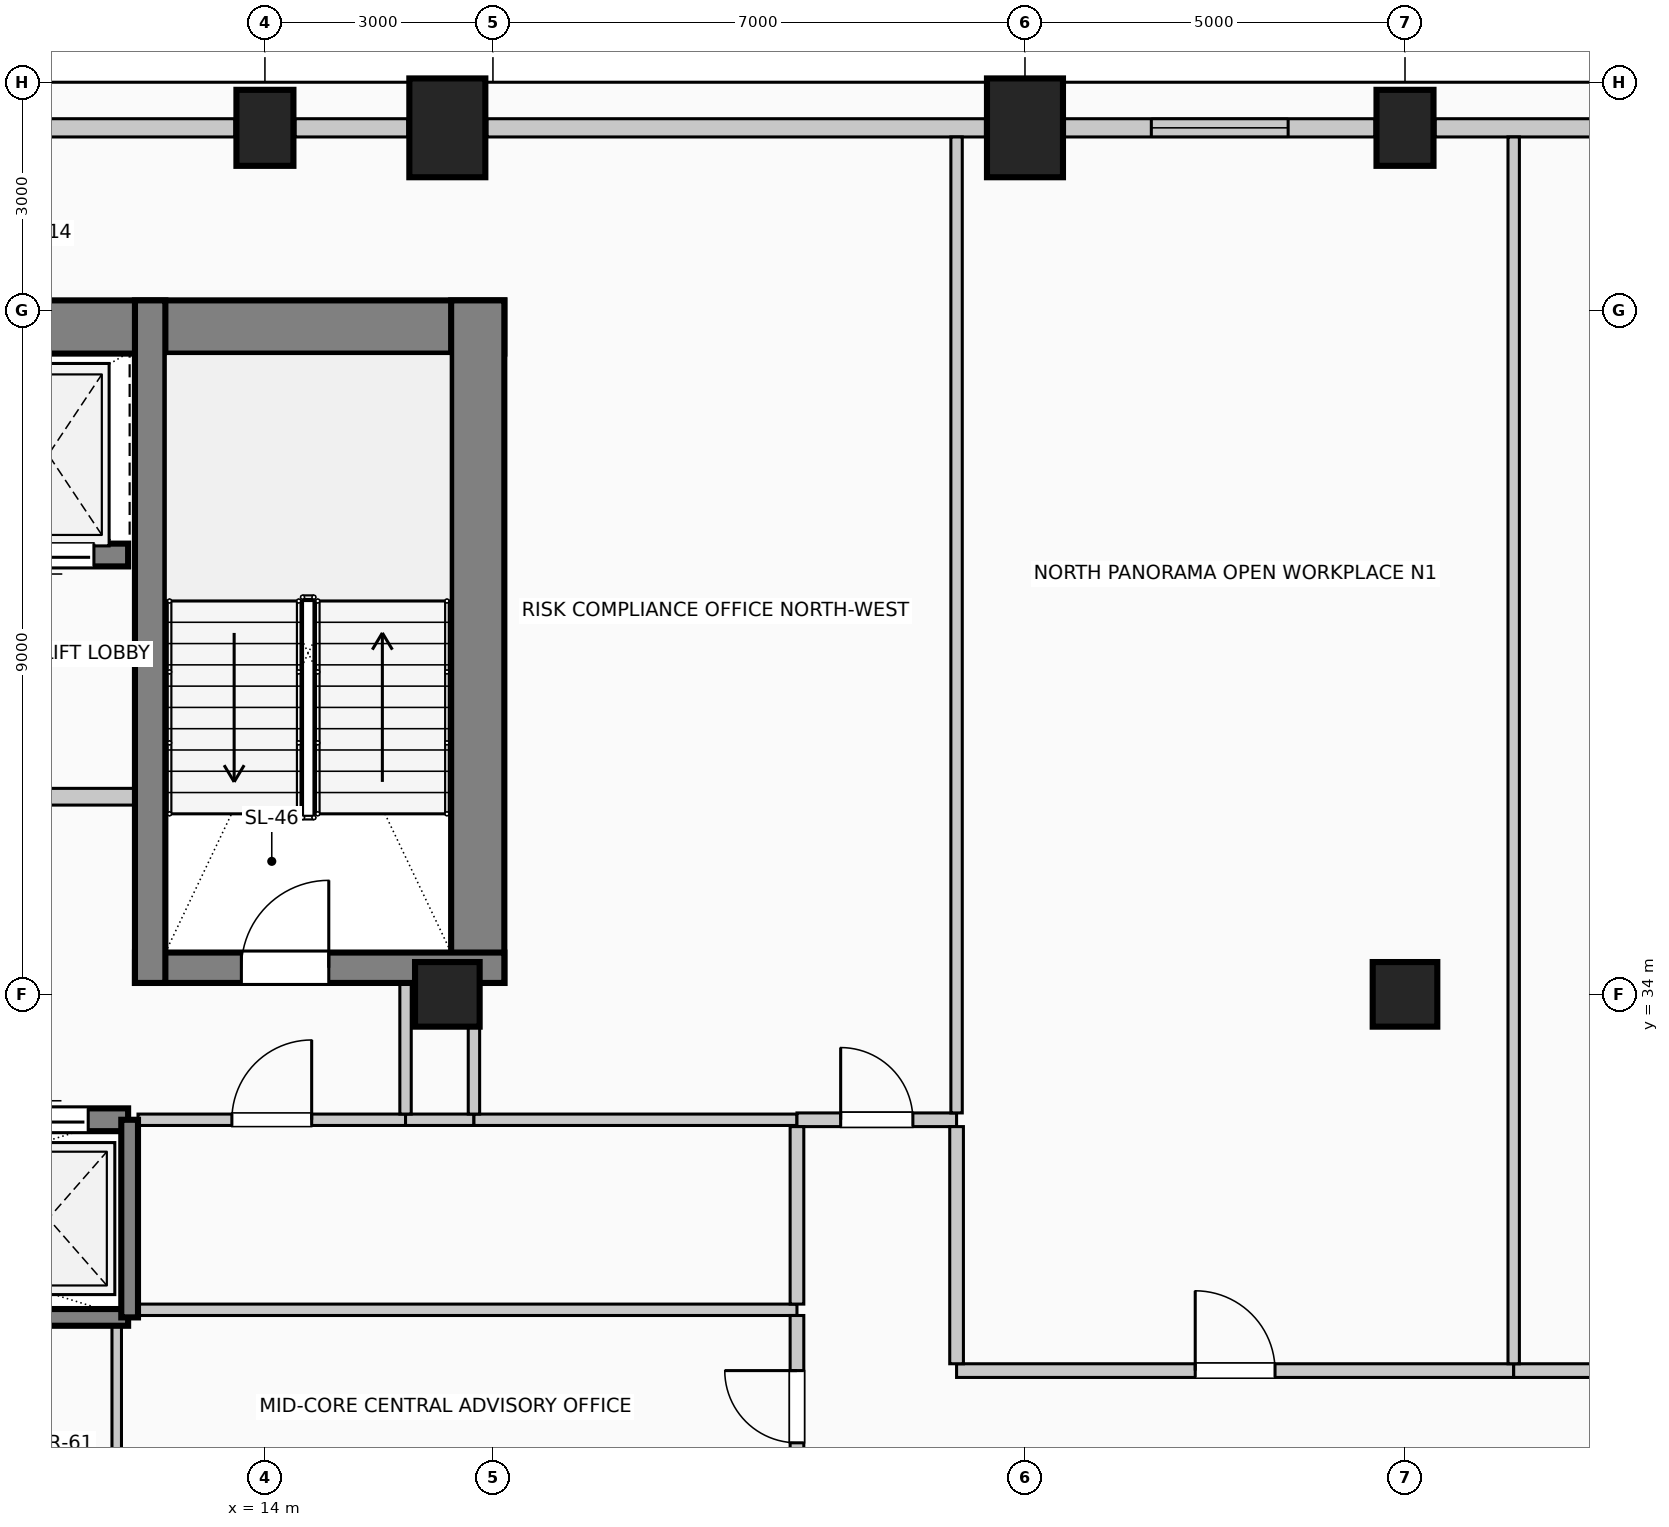
"""IFC4 building model, lengths in metres.
Left out: names, types, materials, properties, quantities, classifications, styles, units other than length and angle.
Written with IfcOpenShell. Run it as: python <this file> out.ifc"""

import sys

from ifc_helpers import new_model, si_unit, direction, frame, frame_2d, origin, origin_2d, place, context, subcontext, project, spatial, rectangle, circle, extrude, element, fill, save


model = new_model("IFC4")
c1 = context("Model", 3, precision=1e-05, world=origin(), true_north=direction((0.0, 1.0)))
c2 = subcontext(c1, "Body", "Model", "MODEL_VIEW")
j1 = project(units=[si_unit("LENGTHUNIT", "METRE"), si_unit("PLANEANGLEUNIT", "RADIAN")], contexts=[c1])
p1 = place(None, origin())
s1 = spatial("IfcSite", under=j1, at=p1, CompositionType="ELEMENT")
p2 = place(p1, origin())
s2 = spatial("IfcBuilding", under=s1, at=p2, CompositionType="ELEMENT")
p3 = place(p2, frame((0.0, 0.0, 248.6)))
s3 = spatial("IfcBuildingStorey", under=s2, at=p3, CompositionType="ELEMENT", Elevation=248.6)
p4 = place(p3, frame((2.85, 42.78, 0.0), z_axis=(0.0, 0.0, 1.0), x_axis=(1.0, 0.0, 0.0)))
e1 = element("IfcWall", 1, at=p4, inside=s3, PredefinedType="SHEAR", context=c2, shape_type="SweptSolid", body=[
    extrude(rectangle(XDim=14.3, YDim=0.7, at=frame_2d((7.15, 0.0))), origin(), (0.0, 0.0, 1.0), 4.0),
])
p5 = place(p3, frame((16.8, 34.15, 0.0), z_axis=(0.0, 0.0, 1.0), x_axis=(0.0, 1.0, 0.0)))
e2 = element("IfcWall", 2, at=p5, inside=s3, PredefinedType="SHEAR", context=c2, shape_type="SweptSolid", body=[
    extrude(rectangle(XDim=8.98, YDim=0.7, at=frame_2d((4.49, 0.0))), origin(), (0.0, 0.0, 1.0), 4.0),
])
p6 = place(p3, frame((12.29, 34.35, 0.0), z_axis=(0.0, 0.0, 1.0), x_axis=(1.0, 0.0, 0.0)))
e3 = element("IfcWall", 3, at=p6, inside=s3, PredefinedType="SHEAR", context=c2, shape_type="SweptSolid", body=[
    extrude(rectangle(XDim=4.86, YDim=0.4, at=frame_2d((2.43, 0.0))), origin(), (0.0, 0.0, 1.0), 4.0),
])
p7 = place(p6, frame((1.4, 0.0, 0.0)))
e4 = element("IfcOpeningElement", 4, at=p7, cuts=e3, PredefinedType="OPENING", context=c2, shape_type="SweptSolid", body=[
    extrude(rectangle(XDim=1.15, YDim=2.2, at=frame_2d((0.575, 1.1))), frame((0.0, 0.21, 0.0), z_axis=(0.0, -1.0, 0.0), x_axis=(1.0, 0.0, 0.0)), (0.0, 0.0, 1.0), 0.42),
])
p8 = place(p3, frame((12.49, 34.15, 0.0), z_axis=(0.0, 0.0, 1.0), x_axis=(0.0, 1.0, 0.0)))
e5 = element("IfcWall", 5, at=p8, inside=s3, PredefinedType="SHEAR", context=c2, shape_type="SweptSolid", body=[
    extrude(rectangle(XDim=8.98, YDim=0.4, at=frame_2d((4.49, 0.0))), origin(), (0.0, 0.0, 1.0), 4.0),
])
p9 = place(p3, frame((14.0, 45.4, 0.0), z_axis=(0.0, 0.0, 1.0), x_axis=(1.0, 0.0, 0.0)))
e6 = element("IfcColumn", 6, at=p9, inside=s3, PredefinedType="COLUMN", context=c2, shape_type="SweptSolid", body=[
    extrude(rectangle(XDim=0.75, YDim=1.0, at=origin_2d()), origin(), (0.0, 0.0, 1.0), 4.0),
])
for number, where, z_axis, x_axis in (
    (7, (16.4, 45.4, 0.0), (0.0, 0.0, 1.0), (1.0, 0.0, 0.0)),
    (8, (24.0, 45.4, 0.0), (0.0, 0.0, 1.0), (1.0, 0.0, 0.0)),
):
    element("IfcColumn", number, at=place(p3, frame(where, z_axis=z_axis, x_axis=x_axis)), inside=s3, PredefinedType="COLUMN", context=c2, shape_type="SweptSolid", body=[
        extrude(rectangle(XDim=1.0, YDim=1.3, at=origin_2d()), origin(), (0.0, 0.0, 1.0), 4.0),
    ])
p10 = place(p3, frame((29.0, 45.4, 0.0), z_axis=(0.0, 0.0, 1.0), x_axis=(1.0, 0.0, 0.0)))
e9 = element("IfcColumn", 9, at=p10, inside=s3, PredefinedType="COLUMN", context=c2, shape_type="SweptSolid", body=[
    extrude(rectangle(XDim=0.75, YDim=1.0, at=origin_2d()), origin(), (0.0, 0.0, 1.0), 4.0),
])
for number, where, z_axis, x_axis in (
    (10, (16.4, 34.0, 0.0), (0.0, 0.0, 1.0), (1.0, 0.0, 0.0)),
    (11, (29.0, 34.0, 0.0), (0.0, 0.0, 1.0), (1.0, 0.0, 0.0)),
):
    element("IfcColumn", number, at=place(p3, frame(where, z_axis=z_axis, x_axis=x_axis)), inside=s3, PredefinedType="COLUMN", context=c2, shape_type="SweptSolid", body=[
        extrude(circle(Radius=0.425, at=origin_2d()), origin(), (0.0, 0.0, 1.0), 4.0),
    ])
p11 = place(p3, frame((8.895, 45.4, 0.0), z_axis=(0.0, 0.0, 1.0), x_axis=(1.0, 0.0, 0.0)))
e12 = element("IfcWall", 12, at=p11, inside=s3, PredefinedType="SOLIDWALL", context=c2, shape_type="SweptSolid", body=[
    extrude(rectangle(XDim=4.71, YDim=0.24, at=frame_2d((2.355, 0.0))), origin(), (0.0, 0.0, 1.0), 3.0),
])
p12 = place(p3, frame((14.395, 45.4, 0.0), z_axis=(0.0, 0.0, 1.0), x_axis=(1.0, 0.0, 0.0)))
e13 = element("IfcWall", 13, at=p12, inside=s3, PredefinedType="SOLIDWALL", context=c2, shape_type="SweptSolid", body=[
    extrude(rectangle(XDim=1.485, YDim=0.24, at=frame_2d((0.742, 0.0))), origin(), (0.0, 0.0, 1.0), 3.0),
])
p13 = place(p3, frame((16.92, 45.4, 0.0), z_axis=(0.0, 0.0, 1.0), x_axis=(1.0, 0.0, 0.0)))
e14 = element("IfcWall", 14, at=p13, inside=s3, PredefinedType="SOLIDWALL", context=c2, shape_type="SweptSolid", body=[
    extrude(rectangle(XDim=6.56, YDim=0.24, at=frame_2d((3.28, 0.0))), origin(), (0.0, 0.0, 1.0), 3.0),
])
p14 = place(p3, frame((24.52, 45.4, 0.0), z_axis=(0.0, 0.0, 1.0), x_axis=(1.0, 0.0, 0.0)))
e15 = element("IfcWall", 15, at=p14, inside=s3, PredefinedType="SOLIDWALL", context=c2, shape_type="SweptSolid", body=[
    extrude(rectangle(XDim=4.085, YDim=0.24, at=frame_2d((2.042, 0.0))), origin(), (0.0, 0.0, 1.0), 3.0),
])
p15 = place(p14, frame((1.143, 0.0, 0.42)))
e16 = element("IfcOpeningElement", 16, at=p15, cuts=e15, PredefinedType="OPENING", context=c2, shape_type="SweptSolid", body=[
    extrude(rectangle(XDim=1.8, YDim=2.2, at=frame_2d((0.9, 1.1))), frame((0.0, 0.13, 0.0), z_axis=(0.0, -1.0, 0.0), x_axis=(1.0, 0.0, 0.0)), (0.0, 0.0, 1.0), 0.26),
])
p16 = place(p3, frame((29.395, 45.4, 0.0), z_axis=(0.0, 0.0, 1.0), x_axis=(1.0, 0.0, 0.0)))
e17 = element("IfcWall", 17, at=p16, inside=s3, PredefinedType="SOLIDWALL", context=c2, shape_type="SweptSolid", body=[
    extrude(rectangle(XDim=4.085, YDim=0.24, at=frame_2d((2.042, 0.0))), origin(), (0.0, 0.0, 1.0), 3.0),
])
p17 = place(p3, frame((10.05, 32.35, 0.0), z_axis=(0.0, 0.0, 1.0), x_axis=(1.0, 0.0, 0.0)))
e18 = element("IfcWall", 18, at=p17, inside=s3, PredefinedType="SOLIDWALL", context=c2, shape_type="SweptSolid", body=[
    extrude(rectangle(XDim=2.15, YDim=0.3, at=frame_2d((1.075, 0.0))), origin(), (0.0, 0.0, 1.0), 4.0),
])
p18 = place(p17, frame((0.525, 0.0, 0.0)))
e19 = element("IfcOpeningElement", 19, at=p18, cuts=e18, PredefinedType="OPENING", context=c2, shape_type="SweptSolid", body=[
    extrude(rectangle(XDim=1.1, YDim=2.2, at=frame_2d((0.55, 1.1))), frame((0.0, 0.16, 0.0), z_axis=(0.0, -1.0, 0.0), x_axis=(1.0, 0.0, 0.0)), (0.0, 0.0, 1.0), 0.32),
])
p19 = place(p3, frame((12.2, 39.78, 0.0), z_axis=(0.0, 0.0, 1.0), x_axis=(-1.0, 0.0, 0.0)))
e20 = element("IfcWall", 20, at=p19, inside=s3, PredefinedType="SOLIDWALL", context=c2, shape_type="SweptSolid", body=[
    extrude(rectangle(XDim=2.2, YDim=0.3, at=frame_2d((1.1, 0.0))), origin(), (0.0, 0.0, 1.0), 4.0),
])
p20 = place(p19, frame((0.45, 0.0, 0.0)))
e21 = element("IfcOpeningElement", 21, at=p20, cuts=e20, PredefinedType="OPENING", context=c2, shape_type="SweptSolid", body=[
    extrude(rectangle(XDim=1.3, YDim=2.25, at=frame_2d((0.65, 1.125))), frame((0.0, 0.16, 0.0), z_axis=(0.0, -1.0, 0.0), x_axis=(1.0, 0.0, 0.0)), (0.0, 0.0, 1.0), 0.32),
])
p21 = place(p3, frame((3.55, 29.75, 0.0), z_axis=(0.0, 0.0, 1.0), x_axis=(1.0, 0.0, 0.0)))
e22 = element("IfcWall", 22, at=p21, inside=s3, PredefinedType="SOLIDWALL", context=c2, shape_type="SweptSolid", body=[
    extrude(rectangle(XDim=8.65, YDim=0.22, at=frame_2d((4.325, 0.0))), origin(), (0.0, 0.0, 1.0), 4.0),
])
p22 = place(p3, frame((12.22, 29.75, 0.0), z_axis=(0.0, 0.0, 1.0), x_axis=(0.0, 1.0, 0.0)))
e23 = element("IfcWall", 23, at=p22, inside=s3, PredefinedType="SOLIDWALL", context=c2, shape_type="SweptSolid", body=[
    extrude(rectangle(XDim=2.6, YDim=0.22, at=frame_2d((1.3, 0.0))), origin(), (0.0, 0.0, 1.0), 4.0),
])
p23 = place(p3, frame((7.51, 36.6, 0.0), z_axis=(0.0, 0.0, 1.0), x_axis=(1.0, 0.0, 0.0)))
e24 = element("IfcWall", 24, at=p23, inside=s3, PredefinedType="PARTITIONING", context=c2, shape_type="SweptSolid", body=[
    extrude(rectangle(XDim=4.98, YDim=0.22, at=frame_2d((2.49, 0.0))), origin(), (0.0, 0.0, 1.0), 3.75),
])
p24 = place(p23, frame((1.94, 0.0, 0.0)))
e25 = element("IfcOpeningElement", 25, at=p24, cuts=e24, PredefinedType="OPENING", context=c2, shape_type="SweptSolid", body=[
    extrude(rectangle(XDim=1.1, YDim=2.2, at=frame_2d((0.55, 1.1))), frame((0.0, 0.12, 0.0), z_axis=(0.0, -1.0, 0.0), x_axis=(1.0, 0.0, 0.0)), (0.0, 0.0, 1.0), 0.24),
])
p25 = place(p3, frame((23.1, 29.05, 0.0), z_axis=(0.0, 0.0, 1.0), x_axis=(1.0, 0.0, 0.0)))
e26 = element("IfcWall", 26, at=p25, inside=s3, PredefinedType="PARTITIONING", context=c2, shape_type="SweptSolid", body=[
    extrude(rectangle(XDim=7.33, YDim=0.18, at=frame_2d((3.665, 0.0))), origin(), (0.0, 0.0, 1.0), 3.75),
])
p26 = place(p25, frame((3.14, 0.0, 0.0)))
e27 = element("IfcOpeningElement", 27, at=p26, cuts=e26, PredefinedType="OPENING", context=c2, shape_type="SweptSolid", body=[
    extrude(rectangle(XDim=1.05, YDim=2.15, at=frame_2d((0.525, 1.075))), frame((0.0, 0.1, 0.0), z_axis=(0.0, -1.0, 0.0), x_axis=(1.0, 0.0, 0.0)), (0.0, 0.0, 1.0), 0.2),
])
p27 = place(p3, frame((30.43, 29.05, 0.0), z_axis=(0.0, 0.0, 1.0), x_axis=(1.0, 0.0, 0.0)))
e28 = element("IfcWall", 28, at=p27, inside=s3, PredefinedType="PARTITIONING", context=c2, shape_type="SweptSolid", body=[
    extrude(rectangle(XDim=11.12, YDim=0.18, at=frame_2d((5.56, 0.0))), origin(), (0.0, 0.0, 1.0), 3.75),
])
p28 = place(p27, frame((5.085, 0.0, 0.0)))
e29 = element("IfcOpeningElement", 29, at=p28, cuts=e28, PredefinedType="OPENING", context=c2, shape_type="SweptSolid", body=[
    extrude(rectangle(XDim=0.95, YDim=2.15, at=frame_2d((0.475, 1.075))), frame((0.0, 0.1, 0.0), z_axis=(0.0, -1.0, 0.0), x_axis=(1.0, 0.0, 0.0)), (0.0, 0.0, 1.0), 0.2),
])
p29 = place(p3, frame((12.33, 29.85, 0.0), z_axis=(0.0, 0.0, 1.0), x_axis=(1.0, 0.0, 0.0)))
e30 = element("IfcWall", 30, at=p29, inside=s3, PredefinedType="PARTITIONING", context=c2, shape_type="SweptSolid", body=[
    extrude(rectangle(XDim=8.67, YDim=0.15, at=frame_2d((4.335, 0.0))), origin(), (0.0, 0.0, 1.0), 3.75),
])
p30 = place(p3, frame((12.33, 32.35, 0.0), z_axis=(0.0, 0.0, 1.0), x_axis=(1.0, 0.0, 0.0)))
e31 = element("IfcWall", 31, at=p30, inside=s3, PredefinedType="PARTITIONING", context=c2, shape_type="SweptSolid", body=[
    extrude(rectangle(XDim=3.52, YDim=0.15, at=frame_2d((1.76, 0.0))), origin(), (0.0, 0.0, 1.0), 3.75),
])
p31 = place(p30, frame((1.235, 0.0, 0.0)))
e32 = element("IfcOpeningElement", 32, at=p31, cuts=e31, PredefinedType="OPENING", context=c2, shape_type="SweptSolid", body=[
    extrude(rectangle(XDim=1.05, YDim=2.15, at=frame_2d((0.525, 1.075))), frame((0.0, 0.085, 0.0), z_axis=(0.0, -1.0, 0.0), x_axis=(1.0, 0.0, 0.0)), (0.0, 0.0, 1.0), 0.17),
])
p32 = place(p3, frame((15.85, 32.35, 0.0), z_axis=(0.0, 0.0, 1.0), x_axis=(1.0, 0.0, 0.0)))
e33 = element("IfcWall", 33, at=p32, inside=s3, PredefinedType="PARTITIONING", context=c2, shape_type="SweptSolid", body=[
    extrude(rectangle(XDim=0.9, YDim=0.15, at=frame_2d((0.45, 0.0))), origin(), (0.0, 0.0, 1.0), 3.75),
])
p33 = place(p3, frame((16.75, 32.35, 0.0), z_axis=(0.0, 0.0, 1.0), x_axis=(1.0, 0.0, 0.0)))
e34 = element("IfcWall", 34, at=p33, inside=s3, PredefinedType="PARTITIONING", context=c2, shape_type="SweptSolid", body=[
    extrude(rectangle(XDim=4.25, YDim=0.15, at=frame_2d((2.125, 0.0))), origin(), (0.0, 0.0, 1.0), 3.75),
])
p34 = place(p3, frame((21.0, 32.35, 0.0), z_axis=(0.0, 0.0, 1.0), x_axis=(1.0, 0.0, 0.0)))
e35 = element("IfcWall", 35, at=p34, inside=s3, PredefinedType="PARTITIONING", context=c2, shape_type="SweptSolid", body=[
    extrude(rectangle(XDim=2.1, YDim=0.18, at=frame_2d((1.05, 0.0))), origin(), (0.0, 0.0, 1.0), 3.75),
])
p35 = place(p34, frame((0.575, 0.0, 0.0)))
e36 = element("IfcOpeningElement", 36, at=p35, cuts=e35, PredefinedType="OPENING", context=c2, shape_type="SweptSolid", body=[
    extrude(rectangle(XDim=0.95, YDim=2.15, at=frame_2d((0.475, 1.075))), frame((0.0, 0.1, 0.0), z_axis=(0.0, -1.0, 0.0), x_axis=(1.0, 0.0, 0.0)), (0.0, 0.0, 1.0), 0.2),
])
p36 = place(p3, frame((12.05, 26.863, 0.0), z_axis=(0.0, 0.0, 1.0), x_axis=(0.0, 1.0, 0.0)))
e37 = element("IfcWall", 37, at=p36, inside=s3, PredefinedType="PARTITIONING", context=c2, shape_type="SweptSolid", body=[
    extrude(rectangle(XDim=2.777, YDim=0.125, at=frame_2d((1.389, 0.0))), origin(), (0.0, 0.0, 1.0), 3.75),
])
p37 = place(p3, frame((15.85, 32.425, 0.0), z_axis=(0.0, 0.0, 1.0), x_axis=(0.0, 1.0, 0.0)))
e38 = element("IfcWall", 38, at=p37, inside=s3, PredefinedType="PARTITIONING", context=c2, shape_type="SweptSolid", body=[
    extrude(rectangle(XDim=1.725, YDim=0.15, at=frame_2d((0.862, 0.0))), origin(), (0.0, 0.0, 1.0), 3.75),
])
p38 = place(p3, frame((16.75, 32.425, 0.0), z_axis=(0.0, 0.0, 1.0), x_axis=(0.0, 1.0, 0.0)))
e39 = element("IfcWall", 39, at=p38, inside=s3, PredefinedType="PARTITIONING", context=c2, shape_type="SweptSolid", body=[
    extrude(rectangle(XDim=1.15, YDim=0.15, at=frame_2d((0.575, 0.0))), origin(), (0.0, 0.0, 1.0), 3.75),
])
p39 = place(p3, frame((21.0, 27.375, 0.0), z_axis=(0.0, 0.0, 1.0), x_axis=(0.0, 1.0, 0.0)))
e40 = element("IfcWall", 40, at=p39, inside=s3, PredefinedType="PARTITIONING", context=c2, shape_type="SweptSolid", body=[
    extrude(rectangle(XDim=2.4, YDim=0.18, at=frame_2d((1.2, 0.0))), origin(), (0.0, 0.0, 1.0), 3.75),
])
p40 = place(p39, frame((0.725, 0.0, 0.0)))
e41 = element("IfcOpeningElement", 41, at=p40, cuts=e40, PredefinedType="OPENING", context=c2, shape_type="SweptSolid", body=[
    extrude(rectangle(XDim=0.95, YDim=2.15, at=frame_2d((0.475, 1.075))), frame((0.0, 0.1, 0.0), z_axis=(0.0, -1.0, 0.0), x_axis=(1.0, 0.0, 0.0)), (0.0, 0.0, 1.0), 0.2),
])
p41 = place(p3, frame((21.0, 29.925, 0.0), z_axis=(0.0, 0.0, 1.0), x_axis=(0.0, 1.0, 0.0)))
e42 = element("IfcWall", 42, at=p41, inside=s3, PredefinedType="PARTITIONING", context=c2, shape_type="SweptSolid", body=[
    extrude(rectangle(XDim=2.335, YDim=0.18, at=frame_2d((1.167, 0.0))), origin(), (0.0, 0.0, 1.0), 3.75),
])
p42 = place(p3, frame((23.1, 29.14, 0.0), z_axis=(0.0, 0.0, 1.0), x_axis=(0.0, 1.0, 0.0)))
e43 = element("IfcWall", 43, at=p42, inside=s3, PredefinedType="PARTITIONING", context=c2, shape_type="SweptSolid", body=[
    extrude(rectangle(XDim=3.12, YDim=0.18, at=frame_2d((1.56, 0.0))), origin(), (0.0, 0.0, 1.0), 3.75),
])
p43 = place(p3, frame((23.1, 32.44, 0.0), z_axis=(0.0, 0.0, 1.0), x_axis=(0.0, 1.0, 0.0)))
e44 = element("IfcWall", 44, at=p43, inside=s3, PredefinedType="PARTITIONING", context=c2, shape_type="SweptSolid", body=[
    extrude(rectangle(XDim=12.84, YDim=0.15, at=frame_2d((6.42, 0.0))), origin(), (0.0, 0.0, 1.0), 3.75),
])
p44 = place(p3, frame((30.43, 29.14, 0.0), z_axis=(0.0, 0.0, 1.0), x_axis=(0.0, 1.0, 0.0)))
e45 = element("IfcWall", 45, at=p44, inside=s3, PredefinedType="PARTITIONING", context=c2, shape_type="SweptSolid", body=[
    extrude(rectangle(XDim=16.14, YDim=0.15, at=frame_2d((8.07, 0.0))), origin(), (0.0, 0.0, 1.0), 3.75),
])
p45 = place(p15, origin())
e46 = element("IfcWindow", 46, at=p45, inside=s3, PartitioningType="SINGLE_PANEL", PredefinedType="WINDOW", context=c2, shape_type="SweptSolid", body=[
    extrude(rectangle(XDim=1.8, YDim=2.2, at=frame_2d((0.9, 1.1))), frame((0.0, 0.03, 0.0), z_axis=(0.0, -1.0, 0.0), x_axis=(1.0, 0.0, 0.0)), (0.0, 0.0, 1.0), 0.06),
])
fill(e16, e46)
p46 = place(p18, origin())
e47 = element("IfcDoor", 47, at=p46, inside=s3, OperationType="SLIDING_TO_RIGHT", PredefinedType="DOOR", context=c2, shape_type="SweptSolid", body=[
    extrude(rectangle(XDim=1.1, YDim=2.2, at=frame_2d((0.55, 1.1))), frame((0.0, 0.025, 0.0), z_axis=(0.0, -1.0, 0.0), x_axis=(1.0, 0.0, 0.0)), (0.0, 0.0, 1.0), 0.05),
])
fill(e19, e47)
p47 = place(p20, origin())
e48 = element("IfcDoor", 48, at=p47, inside=s3, OperationType="SLIDING_TO_RIGHT", PredefinedType="DOOR", context=c2, shape_type="SweptSolid", body=[
    extrude(rectangle(XDim=1.3, YDim=2.25, at=frame_2d((0.65, 1.125))), frame((0.0, 0.025, 0.0), z_axis=(0.0, -1.0, 0.0), x_axis=(1.0, 0.0, 0.0)), (0.0, 0.0, 1.0), 0.05),
])
fill(e21, e48)
p48 = place(p7, origin())
e49 = element("IfcDoor", 49, at=p48, inside=s3, OperationType="SINGLE_SWING_RIGHT", PredefinedType="DOOR", context=c2, shape_type="SweptSolid", body=[
    extrude(rectangle(XDim=1.15, YDim=2.2, at=frame_2d((0.575, 1.1))), frame((0.0, 0.025, 0.0), z_axis=(0.0, -1.0, 0.0), x_axis=(1.0, 0.0, 0.0)), (0.0, 0.0, 1.0), 0.05),
])
fill(e4, e49)
p49 = place(p26, origin())
e50 = element("IfcDoor", 50, at=p49, inside=s3, OperationType="SINGLE_SWING_LEFT", PredefinedType="DOOR", context=c2, shape_type="SweptSolid", body=[
    extrude(rectangle(XDim=1.05, YDim=2.15, at=frame_2d((0.525, 1.075))), frame((0.0, 0.025, 0.0), z_axis=(0.0, -1.0, 0.0), x_axis=(1.0, 0.0, 0.0)), (0.0, 0.0, 1.0), 0.05),
])
fill(e27, e50)
p50 = place(p31, origin())
e51 = element("IfcDoor", 51, at=p50, inside=s3, OperationType="SINGLE_SWING_RIGHT", PredefinedType="DOOR", context=c2, shape_type="SweptSolid", body=[
    extrude(rectangle(XDim=1.05, YDim=2.15, at=frame_2d((0.525, 1.075))), frame((0.0, 0.025, 0.0), z_axis=(0.0, -1.0, 0.0), x_axis=(1.0, 0.0, 0.0)), (0.0, 0.0, 1.0), 0.05),
])
fill(e32, e51)
p51 = place(p35, origin())
e52 = element("IfcDoor", 52, at=p51, inside=s3, OperationType="SINGLE_SWING_LEFT", PredefinedType="DOOR", context=c2, shape_type="SweptSolid", body=[
    extrude(rectangle(XDim=0.95, YDim=2.15, at=frame_2d((0.475, 1.075))), frame((0.0, 0.025, 0.0), z_axis=(0.0, -1.0, 0.0), x_axis=(1.0, 0.0, 0.0)), (0.0, 0.0, 1.0), 0.05),
])
fill(e36, e52)
p52 = place(p40, origin())
e53 = element("IfcDoor", 53, at=p52, inside=s3, OperationType="SINGLE_SWING_RIGHT", PredefinedType="DOOR", context=c2, shape_type="SweptSolid", body=[
    extrude(rectangle(XDim=0.95, YDim=2.15, at=frame_2d((0.475, 1.075))), frame((0.0, 0.025, 0.0), z_axis=(0.0, -1.0, 0.0), x_axis=(1.0, 0.0, 0.0)), (0.0, 0.0, 1.0), 0.05),
])
fill(e41, e53)
save(model, sys.argv[1])
